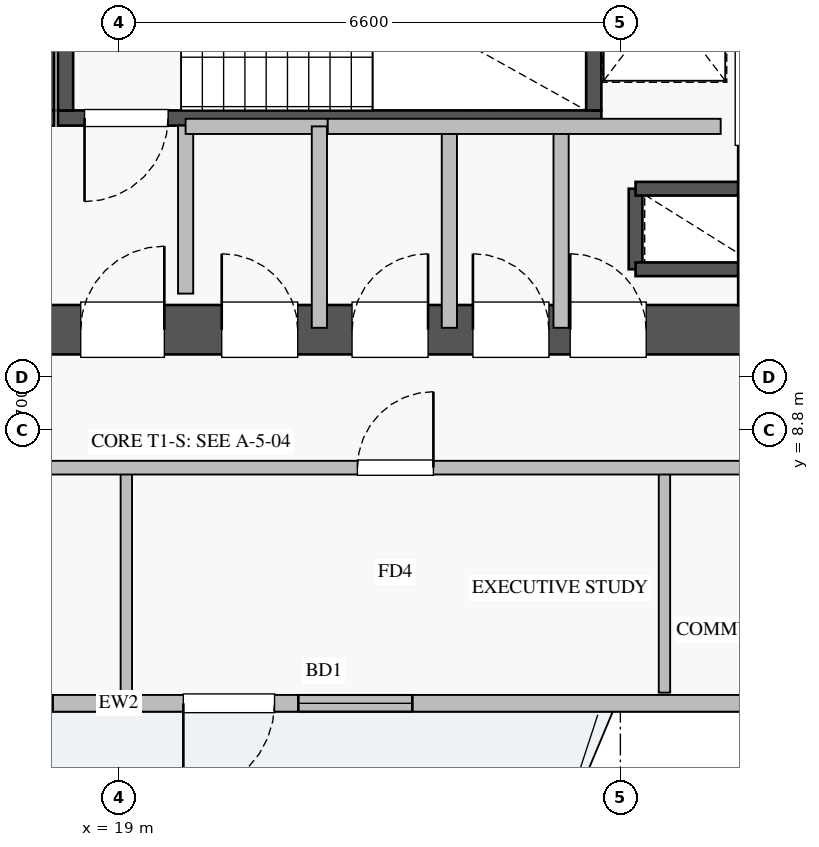
"""IFC4 building model, lengths in metres.
Left out: names, types, materials, properties, quantities, classifications, styles, units other than length and angle.
Written with IfcOpenShell. Run it as: python <this file> out.ifc"""

import sys

from ifc_helpers import new_model, si_unit, direction, frame, frame_2d, origin, place, context, subcontext, project, spatial, rectangle, extrude, source, transform, mapped, element, fill, save


model = new_model("IFC4")
c1 = context("Model", 3, precision=1e-05, world=origin(), true_north=direction((0.0, 1.0)))
c2 = subcontext(c1, "Body", "Model", "MODEL_VIEW")
j1 = project(units=[si_unit("LENGTHUNIT", "METRE"), si_unit("PLANEANGLEUNIT", "RADIAN")], contexts=[c1])
p1 = place(None, origin())
s1 = spatial("IfcSite", under=j1, at=p1, CompositionType="ELEMENT")
p2 = place(p1, origin())
s2 = spatial("IfcBuilding", under=s1, at=p2, CompositionType="ELEMENT")
p3 = place(p2, frame((0.0, 0.0, 173.0)))
s3 = spatial("IfcBuildingStorey", under=s2, at=p3, CompositionType="ELEMENT", Elevation=173.0)
p4 = place(p3, frame((25.8, 10.92, 0.0), z_axis=(0.0, 0.0, 1.0), x_axis=(0.0, 1.0, 0.0)))
e1 = element("IfcWall", 1, at=p4, inside=s3, PredefinedType="SHEAR", context=c2, shape_type="SweptSolid", body=[
    extrude(rectangle(XDim=1.06, YDim=0.18, at=frame_2d((0.53, 0.0))), origin(), (0.0, 0.0, 1.0), 3.0),
])
for number, where, z_axis, x_axis in (
    (2, (25.8, 11.98, 0.0), (0.0, 0.0, 1.0), (1.0, 0.0, 0.0)),
    (3, (25.8, 10.92, 0.0), (0.0, 0.0, 1.0), (1.0, 0.0, 0.0)),
):
    element("IfcWall", number, at=place(p3, frame(where, z_axis=z_axis, x_axis=x_axis)), inside=s3, PredefinedType="SHEAR", context=c2, shape_type="SweptSolid", body=[
        extrude(rectangle(XDim=1.35, YDim=0.18, at=frame_2d((0.675, 0.0))), origin(), (0.0, 0.0, 1.0), 3.0),
    ])
p5 = place(p3, frame((10.85, 12.91, 0.0), z_axis=(0.0, 0.0, 1.0), x_axis=(1.0, 0.0, 0.0)))
e4 = element("IfcWall", 4, at=p5, inside=s3, PredefinedType="SHEAR", context=c2, shape_type="SweptSolid", body=[
    extrude(rectangle(XDim=7.3, YDim=0.2, at=frame_2d((3.65, 0.0))), origin(), (0.0, 0.0, 1.0), 3.25),
])
p6 = place(p5, frame((0.35, 0.0, 0.0)))
e5 = element("IfcOpeningElement", 5, at=p6, cuts=e4, PredefinedType="OPENING", context=c2, shape_type="SweptSolid", body=[
    extrude(rectangle(XDim=1.1, YDim=2.05, at=frame_2d((0.55, 1.025))), frame((0.0, 0.11, 0.0), z_axis=(0.0, -1.0, 0.0), x_axis=(1.0, 0.0, 0.0)), (0.0, 0.0, 1.0), 0.22),
])
p7 = place(p3, frame((18.05, 13.01, 0.0), z_axis=(0.0, 0.0, 1.0), x_axis=(0.0, 1.0, 0.0)))
e6 = element("IfcWall", 6, at=p7, inside=s3, PredefinedType="SHEAR", context=c2, shape_type="SweptSolid", body=[
    extrude(rectangle(XDim=2.94, YDim=0.2, at=frame_2d((1.47, 0.0))), origin(), (0.0, 0.0, 1.0), 3.25),
])
p8 = place(p3, frame((18.2, 12.91, 0.0), z_axis=(0.0, 0.0, 1.0), x_axis=(1.0, 0.0, 0.0)))
e7 = element("IfcWall", 7, at=p8, inside=s3, PredefinedType="SHEAR", context=c2, shape_type="SweptSolid", body=[
    extrude(rectangle(XDim=7.15, YDim=0.2, at=frame_2d((3.575, 0.0))), origin(), (0.0, 0.0, 1.0), 3.25),
])
p9 = place(p8, frame((0.35, 0.0, 0.0)))
e8 = element("IfcOpeningElement", 8, at=p9, cuts=e7, PredefinedType="OPENING", context=c2, shape_type="SweptSolid", body=[
    extrude(rectangle(XDim=1.1, YDim=2.05, at=frame_2d((0.55, 1.025))), frame((0.0, 0.11, 0.0), z_axis=(0.0, -1.0, 0.0), x_axis=(1.0, 0.0, 0.0)), (0.0, 0.0, 1.0), 0.22),
])
for number, where, z_axis, x_axis in (
    (9, (18.3, 13.01, 0.0), (0.0, 0.0, 1.0), (0.0, 1.0, 0.0)),
    (10, (25.25, 13.01, 0.0), (0.0, 0.0, 1.0), (0.0, 1.0, 0.0)),
):
    element("IfcWall", number, at=place(p3, frame(where, z_axis=z_axis, x_axis=x_axis)), inside=s3, PredefinedType="SHEAR", context=c2, shape_type="SweptSolid", body=[
        extrude(rectangle(XDim=2.94, YDim=0.2, at=frame_2d((1.47, 0.0))), origin(), (0.0, 0.0, 1.0), 3.25),
    ])
p10 = place(p3, frame((10.2, 10.125, 0.0), z_axis=(0.0, 0.0, 1.0), x_axis=(1.0, 0.0, 0.0)))
e11 = element("IfcWall", 11, at=p10, inside=s3, PredefinedType="SHEAR", context=c2, shape_type="SweptSolid", body=[
    extrude(rectangle(XDim=17.6, YDim=0.65, at=frame_2d((8.8, 0.0))), origin(), (0.0, 0.0, 1.0), 3.25),
])
p11 = place(p10, frame((1.15, 0.0, 0.0)))
e12 = element("IfcOpeningElement", 12, at=p11, cuts=e11, PredefinedType="OPENING", context=c2, shape_type="SweptSolid", body=[
    extrude(rectangle(XDim=1.1, YDim=2.05, at=frame_2d((0.55, 1.025))), frame((0.0, 0.335, 0.0), z_axis=(0.0, -1.0, 0.0), x_axis=(1.0, 0.0, 0.0)), (0.0, 0.0, 1.0), 0.67),
])
p12 = place(p10, frame((8.3, 0.0, 0.0)))
e13 = element("IfcOpeningElement", 13, at=p12, cuts=e11, PredefinedType="OPENING", context=c2, shape_type="SweptSolid", body=[
    extrude(rectangle(XDim=1.1, YDim=2.05, at=frame_2d((0.55, 1.025))), frame((0.0, 0.335, 0.0), z_axis=(0.0, -1.0, 0.0), x_axis=(1.0, 0.0, 0.0)), (0.0, 0.0, 1.0), 0.67),
])
p13 = place(p10, frame((4.9, 0.0, 0.0)))
e14 = element("IfcOpeningElement", 14, at=p13, cuts=e11, PredefinedType="OPENING", context=c2, shape_type="SweptSolid", body=[
    extrude(rectangle(XDim=1.1, YDim=2.05, at=frame_2d((0.55, 1.025))), frame((0.0, 0.335, 0.0), z_axis=(0.0, -1.0, 0.0), x_axis=(1.0, 0.0, 0.0)), (0.0, 0.0, 1.0), 0.67),
])
p14 = place(p10, frame((14.74, 0.0, 0.0)))
e15 = element("IfcOpeningElement", 15, at=p14, cuts=e11, PredefinedType="OPENING", context=c2, shape_type="SweptSolid", body=[
    extrude(rectangle(XDim=1.0, YDim=2.05, at=frame_2d((0.5, 1.025))), frame((0.0, 0.335, 0.0), z_axis=(0.0, -1.0, 0.0), x_axis=(1.0, 0.0, 0.0)), (0.0, 0.0, 1.0), 0.67),
])
p15 = place(p10, frame((10.155, 0.0, 0.0)))
e16 = element("IfcOpeningElement", 16, at=p15, cuts=e11, PredefinedType="OPENING", context=c2, shape_type="SweptSolid", body=[
    extrude(rectangle(XDim=1.0, YDim=2.05, at=frame_2d((0.5, 1.025))), frame((0.0, 0.335, 0.0), z_axis=(0.0, -1.0, 0.0), x_axis=(1.0, 0.0, 0.0)), (0.0, 0.0, 1.0), 0.67),
])
p16 = place(p10, frame((11.87, 0.0, 0.0)))
e17 = element("IfcOpeningElement", 17, at=p16, cuts=e11, PredefinedType="OPENING", context=c2, shape_type="SweptSolid", body=[
    extrude(rectangle(XDim=1.0, YDim=2.05, at=frame_2d((0.5, 1.025))), frame((0.0, 0.335, 0.0), z_axis=(0.0, -1.0, 0.0), x_axis=(1.0, 0.0, 0.0)), (0.0, 0.0, 1.0), 0.67),
])
p17 = place(p10, frame((13.46, 0.0, 0.0)))
e18 = element("IfcOpeningElement", 18, at=p17, cuts=e11, PredefinedType="OPENING", context=c2, shape_type="SweptSolid", body=[
    extrude(rectangle(XDim=1.0, YDim=2.05, at=frame_2d((0.5, 1.025))), frame((0.0, 0.335, 0.0), z_axis=(0.0, -1.0, 0.0), x_axis=(1.0, 0.0, 0.0)), (0.0, 0.0, 1.0), 0.67),
])
p18 = place(p3, frame((27.475, 10.45, 0.0), z_axis=(0.0, 0.0, 1.0), x_axis=(0.0, 1.0, 0.0)))
e19 = element("IfcWall", 19, at=p18, inside=s3, PredefinedType="SHEAR", context=c2, shape_type="SweptSolid", body=[
    extrude(rectangle(XDim=5.9, YDim=0.65, at=frame_2d((2.95, 0.0))), origin(), (0.0, 0.0, 1.0), 3.25),
])
p19 = place(p18, frame((2.1, 0.0, 0.0)))
e20 = element("IfcOpeningElement", 20, at=p19, cuts=e19, PredefinedType="OPENING", context=c2, shape_type="SweptSolid", body=[
    extrude(rectangle(XDim=1.3, YDim=2.05, at=frame_2d((0.65, 1.025))), frame((0.0, 0.335, 0.0), z_axis=(0.0, -1.0, 0.0), x_axis=(1.0, 0.0, 0.0)), (0.0, 0.0, 1.0), 0.67),
])
p20 = place(p3, frame((6.55, 5.21, 0.0), z_axis=(0.0, 0.0, 1.0), x_axis=(1.0, 0.0, 0.0)))
e21 = element("IfcWall", 21, at=p20, inside=s3, PredefinedType="STANDARD", context=c2, shape_type="SweptSolid", body=[
    extrude(rectangle(XDim=24.9, YDim=0.22, at=frame_2d((12.45, 0.0))), origin(), (0.0, 0.0, 1.0), 2.54),
])
p21 = place(p20, frame((13.3, 0.0, 0.0)))
e22 = element("IfcOpeningElement", 22, at=p21, cuts=e21, PredefinedType="OPENING", context=c2, shape_type="SweptSolid", body=[
    extrude(rectangle(XDim=1.2, YDim=2.1, at=frame_2d((0.6, 1.05))), frame((0.0, 0.12, 0.0), z_axis=(0.0, -1.0, 0.0), x_axis=(1.0, 0.0, 0.0)), (0.0, 0.0, 1.0), 0.24),
])
p22 = place(p20, frame((0.373, 0.0, 0.9)))
e23 = element("IfcOpeningElement", 23, at=p22, cuts=e21, PredefinedType="OPENING", context=c2, shape_type="SweptSolid", body=[
    extrude(rectangle(XDim=1.5, YDim=1.5, at=frame_2d((0.75, 0.75))), frame((0.0, 0.12, 0.0), z_axis=(0.0, -1.0, 0.0), x_axis=(1.0, 0.0, 0.0)), (0.0, 0.0, 1.0), 0.24),
])
p23 = place(p20, frame((9.78, 0.0, 0.9)))
e24 = element("IfcOpeningElement", 24, at=p23, cuts=e21, PredefinedType="OPENING", context=c2, shape_type="SweptSolid", body=[
    extrude(rectangle(XDim=1.8, YDim=1.5, at=frame_2d((0.9, 0.75))), frame((0.0, 0.12, 0.0), z_axis=(0.0, -1.0, 0.0), x_axis=(1.0, 0.0, 0.0)), (0.0, 0.0, 1.0), 0.24),
])
p24 = place(p20, frame((14.813, 0.0, 0.9)))
e25 = element("IfcOpeningElement", 25, at=p24, cuts=e21, PredefinedType="OPENING", context=c2, shape_type="SweptSolid", body=[
    extrude(rectangle(XDim=1.5, YDim=1.45, at=frame_2d((0.75, 0.725))), frame((0.0, 0.12, 0.0), z_axis=(0.0, -1.0, 0.0), x_axis=(1.0, 0.0, 0.0)), (0.0, 0.0, 1.0), 0.24),
])
p25 = place(p20, frame((20.738, 0.0, 0.9)))
e26 = element("IfcOpeningElement", 26, at=p25, cuts=e21, PredefinedType="OPENING", context=c2, shape_type="SweptSolid", body=[
    extrude(rectangle(XDim=2.1, YDim=1.46, at=frame_2d((1.05, 0.73))), frame((0.0, 0.12, 0.0), z_axis=(0.0, -1.0, 0.0), x_axis=(1.0, 0.0, 0.0)), (0.0, 0.0, 1.0), 0.24),
])
p26 = place(p20, frame((4.152, 0.0, 0.9)))
e27 = element("IfcOpeningElement", 27, at=p26, cuts=e21, PredefinedType="OPENING", context=c2, shape_type="SweptSolid", body=[
    extrude(rectangle(XDim=2.4, YDim=1.5, at=frame_2d((1.2, 0.75))), frame((0.0, 0.12, 0.0), z_axis=(0.0, -1.0, 0.0), x_axis=(1.0, 0.0, 0.0)), (0.0, 0.0, 1.0), 0.24),
])
p27 = place(p3, frame((19.88, 10.6, 0.0), z_axis=(0.0, 0.0, 1.0), x_axis=(0.0, 1.0, 0.0)))
e28 = element("IfcWall", 28, at=p27, inside=s3, PredefinedType="PARTITIONING", context=c2, shape_type="SweptSolid", body=[
    extrude(rectangle(XDim=2.21, YDim=0.2, at=frame_2d((1.105, 0.0))), origin(), (0.0, 0.0, 1.0), 3.0),
])
p28 = place(p3, frame((24.82, 10.15, 0.0), z_axis=(0.0, 0.0, 1.0), x_axis=(0.0, 1.0, 0.0)))
e29 = element("IfcWall", 29, at=p28, inside=s3, PredefinedType="PARTITIONING", context=c2, shape_type="SweptSolid", body=[
    extrude(rectangle(XDim=2.65, YDim=0.2, at=frame_2d((1.325, 0.0))), origin(), (0.0, 0.0, 1.0), 3.0),
])
p29 = place(p3, frame((19.88, 12.8, 0.0), z_axis=(0.0, 0.0, 1.0), x_axis=(1.0, 0.0, 0.0)))
e30 = element("IfcWall", 30, at=p29, inside=s3, PredefinedType="PARTITIONING", context=c2, shape_type="SweptSolid", body=[
    extrude(rectangle(XDim=1.87, YDim=0.2, at=frame_2d((0.935, 0.0))), origin(), (0.0, 0.0, 1.0), 3.0),
])
for number, where, z_axis, x_axis in (
    (31, (21.64, 10.15, 0.0), (0.0, 0.0, 1.0), (0.0, 1.0, 0.0)),
    (32, (23.35, 10.15, 0.0), (0.0, 0.0, 1.0), (0.0, 1.0, 0.0)),
):
    element("IfcWall", number, at=place(p3, frame(where, z_axis=z_axis, x_axis=x_axis)), inside=s3, PredefinedType="PARTITIONING", context=c2, shape_type="SweptSolid", body=[
        extrude(rectangle(XDim=2.65, YDim=0.2, at=frame_2d((1.325, 0.0))), origin(), (0.0, 0.0, 1.0), 3.0),
    ])
p30 = place(p3, frame((21.75, 12.8, 0.0), z_axis=(0.0, 0.0, 1.0), x_axis=(1.0, 0.0, 0.0)))
e33 = element("IfcWall", 33, at=p30, inside=s3, PredefinedType="PARTITIONING", context=c2, shape_type="SweptSolid", body=[
    extrude(rectangle(XDim=5.17, YDim=0.2, at=frame_2d((2.585, 0.0))), origin(), (0.0, 0.0, 1.0), 3.0),
])
p31 = place(p3, frame((19.1, 5.35, 0.0), z_axis=(0.0, 0.0, 1.0), x_axis=(0.0, 1.0, 0.0)))
e34 = element("IfcWall", 34, at=p31, inside=s3, PredefinedType="PARTITIONING", context=c2, shape_type="SweptSolid", body=[
    extrude(rectangle(XDim=2.96, YDim=0.15, at=frame_2d((1.48, 0.0))), origin(), (0.0, 0.0, 1.0), 2.701),
])
p32 = place(p3, frame((26.18, 5.35, 0.0), z_axis=(0.0, 0.0, 1.0), x_axis=(0.0, 1.0, 0.0)))
e35 = element("IfcWall", 35, at=p32, inside=s3, PredefinedType="PARTITIONING", context=c2, shape_type="SweptSolid", body=[
    extrude(rectangle(XDim=2.96, YDim=0.15, at=frame_2d((1.48, 0.0))), origin(), (0.0, 0.0, 1.0), 3.0),
])
p33 = place(p3, frame((8.78, 8.31, 0.0), z_axis=(0.0, 0.0, 1.0), x_axis=(1.0, 0.0, 0.0)))
e36 = element("IfcWall", 36, at=p33, inside=s3, PredefinedType="PARTITIONING", context=c2, shape_type="SweptSolid", body=[
    extrude(rectangle(XDim=23.54, YDim=0.18, at=frame_2d((11.77, 0.0))), origin(), (0.0, 0.0, 1.0), 3.0),
])
p34 = place(p33, frame((2.79, 0.0, 0.0)))
e37 = element("IfcOpeningElement", 37, at=p34, cuts=e36, PredefinedType="OPENING", context=c2, shape_type="SweptSolid", body=[
    extrude(rectangle(XDim=1.0, YDim=2.05, at=frame_2d((0.5, 1.025))), frame((0.0, 0.1, 0.0), z_axis=(0.0, -1.0, 0.0), x_axis=(1.0, 0.0, 0.0)), (0.0, 0.0, 1.0), 0.2),
])
p35 = place(p33, frame((7.95, 0.0, 0.0)))
e38 = element("IfcOpeningElement", 38, at=p35, cuts=e36, PredefinedType="OPENING", context=c2, shape_type="SweptSolid", body=[
    extrude(rectangle(XDim=1.0, YDim=2.05, at=frame_2d((0.5, 1.025))), frame((0.0, 0.1, 0.0), z_axis=(0.0, -1.0, 0.0), x_axis=(1.0, 0.0, 0.0)), (0.0, 0.0, 1.0), 0.2),
])
p36 = place(p33, frame((13.36, 0.0, 0.0)))
e39 = element("IfcOpeningElement", 39, at=p36, cuts=e36, PredefinedType="OPENING", context=c2, shape_type="SweptSolid", body=[
    extrude(rectangle(XDim=1.0, YDim=2.05, at=frame_2d((0.5, 1.025))), frame((0.0, 0.1, 0.0), z_axis=(0.0, -1.0, 0.0), x_axis=(1.0, 0.0, 0.0)), (0.0, 0.0, 1.0), 0.2),
])
p37 = place(p33, frame((19.8, 0.0, 0.0)))
e40 = element("IfcOpeningElement", 40, at=p37, cuts=e36, PredefinedType="OPENING", context=c2, shape_type="SweptSolid", body=[
    extrude(rectangle(XDim=1.0, YDim=2.05, at=frame_2d((0.5, 1.025))), frame((0.0, 0.1, 0.0), z_axis=(0.0, -1.0, 0.0), x_axis=(1.0, 0.0, 0.0)), (0.0, 0.0, 1.0), 0.2),
])
m1 = source(origin(), c2, "Body", "SweptSolid", [
    extrude(rectangle(XDim=1.2, YDim=2.1, at=frame_2d((0.6, 1.05))), frame((0.0, 0.025, 0.0), z_axis=(0.0, -1.0, 0.0), x_axis=(1.0, 0.0, 0.0)), (0.0, 0.0, 1.0), 0.05),
])
p38 = place(p21, frame((1.2, 0.0, 0.0), z_axis=(0.0, 0.0, 1.0), x_axis=(-1.0, 0.0, 0.0)))
e41 = element("IfcDoor", 41, at=p38, inside=s3, OperationType="SINGLE_SWING_LEFT", PredefinedType="DOOR", context=c2, shape_type="MappedRepresentation", body=[
    mapped(m1, transform((0.0, 0.0, 0.0), x_axis=(1.0, 0.0, 0.0), y_axis=(0.0, 1.0, 0.0), z_axis=(0.0, 0.0, 1.0), scale=1.0)),
])
fill(e22, e41)
m2 = source(origin(), c2, "Body", "SweptSolid", [
    extrude(rectangle(XDim=1.8, YDim=1.5, at=frame_2d((0.9, 0.75))), frame((0.0, 0.03, 0.0), z_axis=(0.0, -1.0, 0.0), x_axis=(1.0, 0.0, 0.0)), (0.0, 0.0, 1.0), 0.06),
])
p39 = place(p23, origin())
e42 = element("IfcWindow", 42, at=p39, inside=s3, PartitioningType="DOUBLE_PANEL_VERTICAL", PredefinedType="WINDOW", context=c2, shape_type="MappedRepresentation", body=[
    mapped(m2, transform((0.0, 0.0, 0.0), x_axis=(1.0, 0.0, 0.0), y_axis=(0.0, 1.0, 0.0), z_axis=(0.0, 0.0, 1.0), scale=1.0)),
])
fill(e24, e42)
m3 = source(origin(), c2, "Body", "SweptSolid", [
    extrude(rectangle(XDim=1.5, YDim=1.45, at=frame_2d((0.75, 0.725))), frame((0.0, 0.03, 0.0), z_axis=(0.0, -1.0, 0.0), x_axis=(1.0, 0.0, 0.0)), (0.0, 0.0, 1.0), 0.06),
])
p40 = place(p24, origin())
e43 = element("IfcWindow", 43, at=p40, inside=s3, PartitioningType="DOUBLE_PANEL_VERTICAL", PredefinedType="WINDOW", context=c2, shape_type="MappedRepresentation", body=[
    mapped(m3, transform((0.0, 0.0, 0.0), x_axis=(1.0, 0.0, 0.0), y_axis=(0.0, 1.0, 0.0), z_axis=(0.0, 0.0, 1.0), scale=1.0)),
])
fill(e25, e43)
m4 = source(origin(), c2, "Body", "SweptSolid", [
    extrude(rectangle(XDim=1.1, YDim=2.05, at=frame_2d((0.55, 1.025))), frame((0.0, 0.025, 0.0), z_axis=(0.0, -1.0, 0.0), x_axis=(1.0, 0.0, 0.0)), (0.0, 0.0, 1.0), 0.05),
])
p41 = place(p12, origin())
e44 = element("IfcDoor", 44, at=p41, inside=s3, OperationType="SINGLE_SWING_RIGHT", PredefinedType="DOOR", context=c2, shape_type="MappedRepresentation", body=[
    mapped(m4, transform((0.0, 0.0, 0.0), x_axis=(1.0, 0.0, 0.0), y_axis=(0.0, 1.0, 0.0), z_axis=(0.0, 0.0, 1.0), scale=1.0)),
])
fill(e13, e44)
p42 = place(p9, frame((1.1, 0.0, 0.0), z_axis=(0.0, 0.0, 1.0), x_axis=(-1.0, 0.0, 0.0)))
e45 = element("IfcDoor", 45, at=p42, inside=s3, OperationType="SINGLE_SWING_LEFT", PredefinedType="DOOR", context=c2, shape_type="MappedRepresentation", body=[
    mapped(m4, transform((0.0, 0.0, 0.0), x_axis=(1.0, 0.0, 0.0), y_axis=(0.0, 1.0, 0.0), z_axis=(0.0, 0.0, 1.0), scale=1.0)),
])
fill(e8, e45)
m5 = source(origin(), c2, "Body", "SweptSolid", [
    extrude(rectangle(XDim=1.0, YDim=2.05, at=frame_2d((0.5, 1.025))), frame((0.0, 0.025, 0.0), z_axis=(0.0, -1.0, 0.0), x_axis=(1.0, 0.0, 0.0)), (0.0, 0.0, 1.0), 0.05),
])
p43 = place(p14, origin())
e46 = element("IfcDoor", 46, at=p43, inside=s3, OperationType="SINGLE_SWING_LEFT", PredefinedType="DOOR", context=c2, shape_type="MappedRepresentation", body=[
    mapped(m5, transform((0.0, 0.0, 0.0), x_axis=(1.0, 0.0, 0.0), y_axis=(0.0, 1.0, 0.0), z_axis=(0.0, 0.0, 1.0), scale=1.0)),
])
fill(e15, e46)
p44 = place(p15, origin())
e47 = element("IfcDoor", 47, at=p44, inside=s3, OperationType="SINGLE_SWING_LEFT", PredefinedType="DOOR", context=c2, shape_type="MappedRepresentation", body=[
    mapped(m5, transform((0.0, 0.0, 0.0), x_axis=(1.0, 0.0, 0.0), y_axis=(0.0, 1.0, 0.0), z_axis=(0.0, 0.0, 1.0), scale=1.0)),
])
fill(e16, e47)
p45 = place(p16, origin())
e48 = element("IfcDoor", 48, at=p45, inside=s3, OperationType="SINGLE_SWING_RIGHT", PredefinedType="DOOR", context=c2, shape_type="MappedRepresentation", body=[
    mapped(m5, transform((0.0, 0.0, 0.0), x_axis=(1.0, 0.0, 0.0), y_axis=(0.0, 1.0, 0.0), z_axis=(0.0, 0.0, 1.0), scale=1.0)),
])
fill(e17, e48)
p46 = place(p17, origin())
e49 = element("IfcDoor", 49, at=p46, inside=s3, OperationType="SINGLE_SWING_LEFT", PredefinedType="DOOR", context=c2, shape_type="MappedRepresentation", body=[
    mapped(m5, transform((0.0, 0.0, 0.0), x_axis=(1.0, 0.0, 0.0), y_axis=(0.0, 1.0, 0.0), z_axis=(0.0, 0.0, 1.0), scale=1.0)),
])
fill(e18, e49)
p47 = place(p36, origin())
e50 = element("IfcDoor", 50, at=p47, inside=s3, OperationType="SINGLE_SWING_RIGHT", PredefinedType="DOOR", context=c2, shape_type="MappedRepresentation", body=[
    mapped(m5, transform((0.0, 0.0, 0.0), x_axis=(1.0, 0.0, 0.0), y_axis=(0.0, 1.0, 0.0), z_axis=(0.0, 0.0, 1.0), scale=1.0)),
])
fill(e39, e50)
save(model, sys.argv[1])
